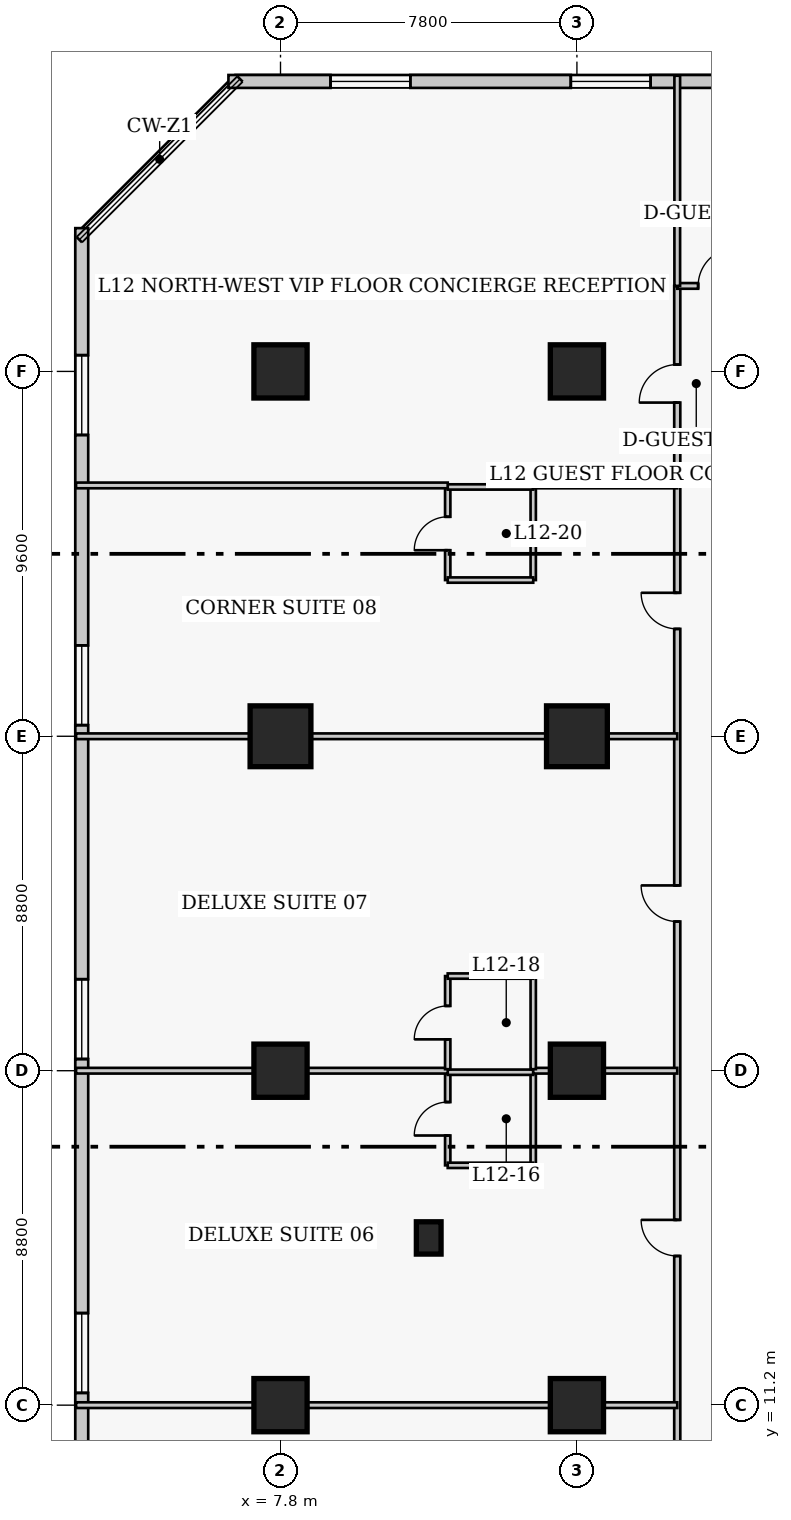
"""IFC4 building model, lengths in metres.
Left out: names, types, materials, properties, quantities, classifications, styles, units other than length and angle.
Written with IfcOpenShell. Run it as: python <this file> out.ifc"""

import sys

from ifc_helpers import new_model, si_unit, direction, frame, frame_2d, origin, origin_2d, place, context, subcontext, project, spatial, rectangle, extrude, element, fill, save


model = new_model("IFC4")
c1 = context("Model", 3, precision=1e-05, world=origin(), true_north=direction((0.0, 1.0)))
c2 = subcontext(c1, "Body", "Model", "MODEL_VIEW")
j1 = project(units=[si_unit("LENGTHUNIT", "METRE"), si_unit("PLANEANGLEUNIT", "RADIAN")], contexts=[c1])
p1 = place(None, origin())
s1 = spatial("IfcSite", under=j1, at=p1, CompositionType="ELEMENT")
p2 = place(p1, origin())
s2 = spatial("IfcBuilding", under=s1, at=p2, CompositionType="ELEMENT")
p3 = place(p2, frame((0.0, 0.0, 52.6)))
s3 = spatial("IfcBuildingStorey", under=s2, at=p3, CompositionType="ELEMENT", Elevation=52.6)
for number, where, z_axis, x_axis in (
    (1, (7.8, 11.2, 0.0), (0.0, 0.0, 1.0), (1.0, 0.0, 0.0)),
    (2, (7.8, 20.0, 0.0), (0.0, 0.0, 1.0), (1.0, 0.0, 0.0)),
):
    element("IfcColumn", number, at=place(p3, frame(where, z_axis=z_axis, x_axis=x_axis)), inside=s3, PredefinedType="COLUMN", context=c2, shape_type="SweptSolid", body=[
        extrude(rectangle(XDim=1.4, YDim=1.4, at=origin_2d()), origin(), (0.0, 0.0, 1.0), 3.8),
    ])
p4 = place(p3, frame((7.8, 28.8, 0.0), z_axis=(0.0, 0.0, 1.0), x_axis=(1.0, 0.0, 0.0)))
e3 = element("IfcColumn", 3, at=p4, inside=s3, PredefinedType="COLUMN", context=c2, shape_type="SweptSolid", body=[
    extrude(rectangle(XDim=1.6, YDim=1.6, at=origin_2d()), origin(), (0.0, 0.0, 1.0), 3.8),
])
for number, where, z_axis, x_axis in (
    (4, (7.8, 38.4, 0.0), (0.0, 0.0, 1.0), (1.0, 0.0, 0.0)),
    (5, (15.6, 11.2, 0.0), (0.0, 0.0, 1.0), (1.0, 0.0, 0.0)),
    (6, (15.6, 20.0, 0.0), (0.0, 0.0, 1.0), (1.0, 0.0, 0.0)),
):
    element("IfcColumn", number, at=place(p3, frame(where, z_axis=z_axis, x_axis=x_axis)), inside=s3, PredefinedType="COLUMN", context=c2, shape_type="SweptSolid", body=[
        extrude(rectangle(XDim=1.4, YDim=1.4, at=origin_2d()), origin(), (0.0, 0.0, 1.0), 3.8),
    ])
p5 = place(p3, frame((15.6, 28.8, 0.0), z_axis=(0.0, 0.0, 1.0), x_axis=(1.0, 0.0, 0.0)))
e7 = element("IfcColumn", 7, at=p5, inside=s3, PredefinedType="COLUMN", context=c2, shape_type="SweptSolid", body=[
    extrude(rectangle(XDim=1.6, YDim=1.6, at=origin_2d()), origin(), (0.0, 0.0, 1.0), 3.8),
])
p6 = place(p3, frame((15.6, 38.4, 0.0), z_axis=(0.0, 0.0, 1.0), x_axis=(1.0, 0.0, 0.0)))
e8 = element("IfcColumn", 8, at=p6, inside=s3, PredefinedType="COLUMN", context=c2, shape_type="SweptSolid", body=[
    extrude(rectangle(XDim=1.4, YDim=1.4, at=origin_2d()), origin(), (0.0, 0.0, 1.0), 3.8),
])
p7 = place(p3, frame((11.7, 15.6, 0.0), z_axis=(0.0, 0.0, 1.0), x_axis=(1.0, 0.0, 0.0)))
e9 = element("IfcColumn", 9, at=p7, inside=s3, PredefinedType="PILASTER", context=c2, shape_type="SweptSolid", body=[
    extrude(rectangle(XDim=0.65, YDim=0.85, at=origin_2d()), origin(), (0.0, 0.0, 1.0), 3.8),
])
p8 = place(p3, frame((36.32, 46.03, 0.0), z_axis=(0.0, 0.0, 1.0), x_axis=(-1.0, 0.0, 0.0)))
e10 = element("IfcWall", 10, at=p8, inside=s3, PredefinedType="SOLIDWALL", context=c2, shape_type="SweptSolid", body=[
    extrude(rectangle(XDim=29.89, YDim=0.34, at=frame_2d((14.945, 0.0))), origin(), (0.0, 0.0, 1.0), 3.54),
])
p9 = place(p8, frame((2.686, 0.0, 0.85)))
e11 = element("IfcOpeningElement", 11, at=p9, cuts=e10, PredefinedType="OPENING", context=c2, shape_type="SweptSolid", body=[
    extrude(rectangle(XDim=2.1, YDim=1.85, at=frame_2d((1.05, 0.925))), frame((0.0, 0.18, 0.0), z_axis=(0.0, -1.0, 0.0), x_axis=(1.0, 0.0, 0.0)), (0.0, 0.0, 1.0), 0.36),
])
p10 = place(p8, frame((10.159, 0.0, 0.85)))
e12 = element("IfcOpeningElement", 12, at=p10, cuts=e10, PredefinedType="OPENING", context=c2, shape_type="SweptSolid", body=[
    extrude(rectangle(XDim=2.1, YDim=1.85, at=frame_2d((1.05, 0.925))), frame((0.0, 0.18, 0.0), z_axis=(0.0, -1.0, 0.0), x_axis=(1.0, 0.0, 0.0)), (0.0, 0.0, 1.0), 0.36),
])
p11 = place(p8, frame((18.781, 0.0, 0.85)))
e13 = element("IfcOpeningElement", 13, at=p11, cuts=e10, PredefinedType="OPENING", context=c2, shape_type="SweptSolid", body=[
    extrude(rectangle(XDim=2.1, YDim=1.85, at=frame_2d((1.05, 0.925))), frame((0.0, 0.18, 0.0), z_axis=(0.0, -1.0, 0.0), x_axis=(1.0, 0.0, 0.0)), (0.0, 0.0, 1.0), 0.36),
])
p12 = place(p8, frame((25.104, 0.0, 0.85)))
e14 = element("IfcOpeningElement", 14, at=p12, cuts=e10, PredefinedType="OPENING", context=c2, shape_type="SweptSolid", body=[
    extrude(rectangle(XDim=2.1, YDim=1.85, at=frame_2d((1.05, 0.925))), frame((0.0, 0.18, 0.0), z_axis=(0.0, -1.0, 0.0), x_axis=(1.0, 0.0, 0.0)), (0.0, 0.0, 1.0), 0.36),
])
p13 = place(p3, frame((2.57, 42.17, 0.0), z_axis=(0.0, 0.0, 1.0), x_axis=(0.0, -1.0, 0.0)))
e15 = element("IfcWall", 15, at=p13, inside=s3, PredefinedType="SOLIDWALL", context=c2, shape_type="SweptSolid", body=[
    extrude(rectangle(XDim=35.14, YDim=0.34, at=frame_2d((17.57, 0.0))), origin(), (0.0, 0.0, 1.0), 3.54),
])
p14 = place(p13, frame((3.343, 0.0, 0.85)))
e16 = element("IfcOpeningElement", 16, at=p14, cuts=e15, PredefinedType="OPENING", context=c2, shape_type="SweptSolid", body=[
    extrude(rectangle(XDim=2.1, YDim=1.85, at=frame_2d((1.05, 0.925))), frame((0.0, 0.18, 0.0), z_axis=(0.0, -1.0, 0.0), x_axis=(1.0, 0.0, 0.0)), (0.0, 0.0, 1.0), 0.36),
])
p15 = place(p13, frame((10.978, 0.0, 0.85)))
e17 = element("IfcOpeningElement", 17, at=p15, cuts=e15, PredefinedType="OPENING", context=c2, shape_type="SweptSolid", body=[
    extrude(rectangle(XDim=2.1, YDim=1.85, at=frame_2d((1.05, 0.925))), frame((0.0, 0.18, 0.0), z_axis=(0.0, -1.0, 0.0), x_axis=(1.0, 0.0, 0.0)), (0.0, 0.0, 1.0), 0.36),
])
p16 = place(p13, frame((19.762, 0.0, 0.85)))
e18 = element("IfcOpeningElement", 18, at=p16, cuts=e15, PredefinedType="OPENING", context=c2, shape_type="SweptSolid", body=[
    extrude(rectangle(XDim=2.1, YDim=1.85, at=frame_2d((1.05, 0.925))), frame((0.0, 0.18, 0.0), z_axis=(0.0, -1.0, 0.0), x_axis=(1.0, 0.0, 0.0)), (0.0, 0.0, 1.0), 0.36),
])
p17 = place(p13, frame((28.548, 0.0, 0.85)))
e19 = element("IfcOpeningElement", 19, at=p17, cuts=e15, PredefinedType="OPENING", context=c2, shape_type="SweptSolid", body=[
    extrude(rectangle(XDim=2.1, YDim=1.85, at=frame_2d((1.05, 0.925))), frame((0.0, 0.18, 0.0), z_axis=(0.0, -1.0, 0.0), x_axis=(1.0, 0.0, 0.0)), (0.0, 0.0, 1.0), 0.36),
])
p18 = place(p3, frame((18.24, 5.05, 0.0), z_axis=(0.0, 0.0, 1.0), x_axis=(0.0, 1.0, 0.0)))
e20 = element("IfcWall", 20, at=p18, inside=s3, PredefinedType="PARTITIONING", context=c2, shape_type="SweptSolid", body=[
    extrude(rectangle(XDim=35.6, YDim=0.16, at=frame_2d((17.8, 0.0))), origin(), (0.0, 0.0, 1.0), 3.54),
])
p19 = place(p18, frame((2.6, 0.0, 0.0)))
e21 = element("IfcOpeningElement", 21, at=p19, cuts=e20, PredefinedType="OPENING", context=c2, shape_type="SweptSolid", body=[
    extrude(rectangle(XDim=0.95, YDim=2.1, at=frame_2d((0.475, 1.05))), frame((0.0, 0.09, 0.0), z_axis=(0.0, -1.0, 0.0), x_axis=(1.0, 0.0, 0.0)), (0.0, 0.0, 1.0), 0.18),
])
p20 = place(p18, frame((10.075, 0.0, 0.0)))
e22 = element("IfcOpeningElement", 22, at=p20, cuts=e20, PredefinedType="OPENING", context=c2, shape_type="SweptSolid", body=[
    extrude(rectangle(XDim=0.95, YDim=2.1, at=frame_2d((0.475, 1.05))), frame((0.0, 0.09, 0.0), z_axis=(0.0, -1.0, 0.0), x_axis=(1.0, 0.0, 0.0)), (0.0, 0.0, 1.0), 0.18),
])
p21 = place(p18, frame((18.875, 0.0, 0.0)))
e23 = element("IfcOpeningElement", 23, at=p21, cuts=e20, PredefinedType="OPENING", context=c2, shape_type="SweptSolid", body=[
    extrude(rectangle(XDim=0.95, YDim=2.1, at=frame_2d((0.475, 1.05))), frame((0.0, 0.09, 0.0), z_axis=(0.0, -1.0, 0.0), x_axis=(1.0, 0.0, 0.0)), (0.0, 0.0, 1.0), 0.18),
])
p22 = place(p18, frame((26.575, 0.0, 0.0)))
e24 = element("IfcOpeningElement", 24, at=p22, cuts=e20, PredefinedType="OPENING", context=c2, shape_type="SweptSolid", body=[
    extrude(rectangle(XDim=0.95, YDim=2.1, at=frame_2d((0.475, 1.05))), frame((0.0, 0.09, 0.0), z_axis=(0.0, -1.0, 0.0), x_axis=(1.0, 0.0, 0.0)), (0.0, 0.0, 1.0), 0.18),
])
p23 = place(p18, frame((32.53, 0.0, 0.0)))
e25 = element("IfcOpeningElement", 25, at=p23, cuts=e20, PredefinedType="OPENING", context=c2, shape_type="SweptSolid", body=[
    extrude(rectangle(XDim=1.0, YDim=2.15, at=frame_2d((0.5, 1.075))), frame((0.0, 0.09, 0.0), z_axis=(0.0, -1.0, 0.0), x_axis=(1.0, 0.0, 0.0)), (0.0, 0.0, 1.0), 0.18),
])
p24 = place(p3, frame((18.24, 40.65, 0.0), z_axis=(0.0, 0.0, 1.0), x_axis=(1.0, 0.0, 0.0)))
e26 = element("IfcWall", 26, at=p24, inside=s3, PredefinedType="PARTITIONING", context=c2, shape_type="SweptSolid", body=[
    extrude(rectangle(XDim=3.86, YDim=0.15, at=frame_2d((1.93, 0.0))), origin(), (0.0, 0.0, 1.0), 3.54),
])
p25 = place(p24, frame((0.55, 0.0, 0.0)))
e27 = element("IfcOpeningElement", 27, at=p25, cuts=e26, PredefinedType="OPENING", context=c2, shape_type="SweptSolid", body=[
    extrude(rectangle(XDim=1.0, YDim=2.15, at=frame_2d((0.5, 1.075))), frame((0.0, 0.085, 0.0), z_axis=(0.0, -1.0, 0.0), x_axis=(1.0, 0.0, 0.0)), (0.0, 0.0, 1.0), 0.17),
])
p26 = place(p3, frame((18.24, 40.65, 0.0), z_axis=(0.0, 0.0, 1.0), x_axis=(0.0, 1.0, 0.0)))
e28 = element("IfcWall", 28, at=p26, inside=s3, PredefinedType="PARTITIONING", context=c2, shape_type="SweptSolid", body=[
    extrude(rectangle(XDim=5.53, YDim=0.15, at=frame_2d((2.765, 0.0))), origin(), (0.0, 0.0, 1.0), 3.54),
])
p27 = place(p3, frame((2.42, 11.2, 0.0), z_axis=(0.0, 0.0, 1.0), x_axis=(1.0, 0.0, 0.0)))
e29 = element("IfcWall", 29, at=p27, inside=s3, PredefinedType="PARTITIONING", context=c2, shape_type="SweptSolid", body=[
    extrude(rectangle(XDim=15.82, YDim=0.15, at=frame_2d((7.91, 0.0))), origin(), (0.0, 0.0, 1.0), 2.593),
])
p28 = place(p3, frame((12.2, 17.51, 0.0), z_axis=(0.0, 0.0, 1.0), x_axis=(0.0, 1.0, 0.0)))
e30 = element("IfcWall", 30, at=p28, inside=s3, PredefinedType="PLUMBINGWALL", context=c2, shape_type="SweptSolid", body=[
    extrude(rectangle(XDim=2.45, YDim=0.14, at=frame_2d((1.225, 0.0))), origin(), (0.0, 0.0, 1.0), 3.54),
])
p29 = place(p28, frame((0.785, 0.0, 0.0)))
e31 = element("IfcOpeningElement", 31, at=p29, cuts=e30, PredefinedType="OPENING", context=c2, shape_type="SweptSolid", body=[
    extrude(rectangle(XDim=0.88, YDim=2.05, at=frame_2d((0.44, 1.025))), frame((0.0, 0.08, 0.0), z_axis=(0.0, -1.0, 0.0), x_axis=(1.0, 0.0, 0.0)), (0.0, 0.0, 1.0), 0.16),
])
p30 = place(p3, frame((14.45, 17.51, 0.0), z_axis=(0.0, 0.0, 1.0), x_axis=(0.0, 1.0, 0.0)))
e32 = element("IfcWall", 32, at=p30, inside=s3, PredefinedType="PLUMBINGWALL", context=c2, shape_type="SweptSolid", body=[
    extrude(rectangle(XDim=2.45, YDim=0.14, at=frame_2d((1.225, 0.0))), origin(), (0.0, 0.0, 1.0), 3.54),
])
p31 = place(p3, frame((12.2, 17.51, 0.0), z_axis=(0.0, 0.0, 1.0), x_axis=(1.0, 0.0, 0.0)))
e33 = element("IfcWall", 33, at=p31, inside=s3, PredefinedType="PLUMBINGWALL", context=c2, shape_type="SweptSolid", body=[
    extrude(rectangle(XDim=2.25, YDim=0.14, at=frame_2d((1.125, 0.0))), origin(), (0.0, 0.0, 1.0), 3.54),
])
p32 = place(p3, frame((12.2, 19.96, 0.0), z_axis=(0.0, 0.0, 1.0), x_axis=(1.0, 0.0, 0.0)))
e34 = element("IfcWall", 34, at=p32, inside=s3, PredefinedType="PLUMBINGWALL", context=c2, shape_type="SweptSolid", body=[
    extrude(rectangle(XDim=2.25, YDim=0.14, at=frame_2d((1.125, 0.0))), origin(), (0.0, 0.0, 1.0), 2.593),
])
p33 = place(p3, frame((2.42, 20.0, 0.0), z_axis=(0.0, 0.0, 1.0), x_axis=(1.0, 0.0, 0.0)))
e35 = element("IfcWall", 35, at=p33, inside=s3, PredefinedType="PARTITIONING", context=c2, shape_type="SweptSolid", body=[
    extrude(rectangle(XDim=9.78, YDim=0.15, at=frame_2d((4.89, 0.0))), origin(), (0.0, 0.0, 1.0), 2.593),
])
p34 = place(p3, frame((14.45, 20.0, 0.0), z_axis=(0.0, 0.0, 1.0), x_axis=(1.0, 0.0, 0.0)))
e36 = element("IfcWall", 36, at=p34, inside=s3, PredefinedType="PARTITIONING", context=c2, shape_type="SweptSolid", body=[
    extrude(rectangle(XDim=3.79, YDim=0.15, at=frame_2d((1.895, 0.0))), origin(), (0.0, 0.0, 1.0), 2.593),
])
p35 = place(p3, frame((12.2, 20.04, 0.0), z_axis=(0.0, 0.0, 1.0), x_axis=(0.0, 1.0, 0.0)))
e37 = element("IfcWall", 37, at=p35, inside=s3, PredefinedType="PLUMBINGWALL", context=c2, shape_type="SweptSolid", body=[
    extrude(rectangle(XDim=2.45, YDim=0.14, at=frame_2d((1.225, 0.0))), origin(), (0.0, 0.0, 1.0), 3.54),
])
p36 = place(p35, frame((0.785, 0.0, 0.0)))
e38 = element("IfcOpeningElement", 38, at=p36, cuts=e37, PredefinedType="OPENING", context=c2, shape_type="SweptSolid", body=[
    extrude(rectangle(XDim=0.88, YDim=2.05, at=frame_2d((0.44, 1.025))), frame((0.0, 0.08, 0.0), z_axis=(0.0, -1.0, 0.0), x_axis=(1.0, 0.0, 0.0)), (0.0, 0.0, 1.0), 0.16),
])
p37 = place(p3, frame((14.45, 20.04, 0.0), z_axis=(0.0, 0.0, 1.0), x_axis=(0.0, 1.0, 0.0)))
e39 = element("IfcWall", 39, at=p37, inside=s3, PredefinedType="PLUMBINGWALL", context=c2, shape_type="SweptSolid", body=[
    extrude(rectangle(XDim=2.45, YDim=0.14, at=frame_2d((1.225, 0.0))), origin(), (0.0, 0.0, 1.0), 3.54),
])
p38 = place(p3, frame((12.2, 22.49, 0.0), z_axis=(0.0, 0.0, 1.0), x_axis=(1.0, 0.0, 0.0)))
e40 = element("IfcWall", 40, at=p38, inside=s3, PredefinedType="PLUMBINGWALL", context=c2, shape_type="SweptSolid", body=[
    extrude(rectangle(XDim=2.25, YDim=0.14, at=frame_2d((1.125, 0.0))), origin(), (0.0, 0.0, 1.0), 3.54),
])
p39 = place(p3, frame((2.42, 28.8, 0.0), z_axis=(0.0, 0.0, 1.0), x_axis=(1.0, 0.0, 0.0)))
e41 = element("IfcWall", 41, at=p39, inside=s3, PredefinedType="PARTITIONING", context=c2, shape_type="SweptSolid", body=[
    extrude(rectangle(XDim=15.82, YDim=0.15, at=frame_2d((7.91, 0.0))), origin(), (0.0, 0.0, 1.0), 2.593),
])
p40 = place(p3, frame((12.2, 32.91, 0.0), z_axis=(0.0, 0.0, 1.0), x_axis=(0.0, 1.0, 0.0)))
e42 = element("IfcWall", 42, at=p40, inside=s3, PredefinedType="PLUMBINGWALL", context=c2, shape_type="SweptSolid", body=[
    extrude(rectangle(XDim=2.45, YDim=0.14, at=frame_2d((1.225, 0.0))), origin(), (0.0, 0.0, 1.0), 3.54),
])
p41 = place(p40, frame((0.785, 0.0, 0.0)))
e43 = element("IfcOpeningElement", 43, at=p41, cuts=e42, PredefinedType="OPENING", context=c2, shape_type="SweptSolid", body=[
    extrude(rectangle(XDim=0.88, YDim=2.05, at=frame_2d((0.44, 1.025))), frame((0.0, 0.08, 0.0), z_axis=(0.0, -1.0, 0.0), x_axis=(1.0, 0.0, 0.0)), (0.0, 0.0, 1.0), 0.16),
])
p42 = place(p3, frame((14.45, 32.91, 0.0), z_axis=(0.0, 0.0, 1.0), x_axis=(0.0, 1.0, 0.0)))
e44 = element("IfcWall", 44, at=p42, inside=s3, PredefinedType="PLUMBINGWALL", context=c2, shape_type="SweptSolid", body=[
    extrude(rectangle(XDim=2.45, YDim=0.14, at=frame_2d((1.225, 0.0))), origin(), (0.0, 0.0, 1.0), 3.54),
])
for number, where, z_axis, x_axis in (
    (45, (12.2, 32.91, 0.0), (0.0, 0.0, 1.0), (1.0, 0.0, 0.0)),
    (46, (12.2, 35.36, 0.0), (0.0, 0.0, 1.0), (1.0, 0.0, 0.0)),
):
    element("IfcWall", number, at=place(p3, frame(where, z_axis=z_axis, x_axis=x_axis)), inside=s3, PredefinedType="PLUMBINGWALL", context=c2, shape_type="SweptSolid", body=[
        extrude(rectangle(XDim=2.25, YDim=0.14, at=frame_2d((1.125, 0.0))), origin(), (0.0, 0.0, 1.0), 3.54),
    ])
p43 = place(p3, frame((2.42, 35.4, 0.0), z_axis=(0.0, 0.0, 1.0), x_axis=(1.0, 0.0, 0.0)))
e47 = element("IfcWall", 47, at=p43, inside=s3, PredefinedType="PARTITIONING", context=c2, shape_type="SweptSolid", body=[
    extrude(rectangle(XDim=9.78, YDim=0.15, at=frame_2d((4.89, 0.0))), origin(), (0.0, 0.0, 1.0), 3.54),
])
p44 = place(p3, frame((14.45, 35.4, 0.0), z_axis=(0.0, 0.0, 1.0), x_axis=(1.0, 0.0, 0.0)))
e48 = element("IfcWall", 48, at=p44, inside=s3, PredefinedType="PARTITIONING", context=c2, shape_type="SweptSolid", body=[
    extrude(rectangle(XDim=3.79, YDim=0.15, at=frame_2d((1.895, 0.0))), origin(), (0.0, 0.0, 1.0), 3.54),
])
p45 = place(p11, origin())
e49 = element("IfcWindow", 49, at=p45, inside=s3, PartitioningType="SINGLE_PANEL", PredefinedType="WINDOW", context=c2, shape_type="SweptSolid", body=[
    extrude(rectangle(XDim=2.1, YDim=1.85, at=frame_2d((1.05, 0.925))), frame((0.0, 0.03, 0.0), z_axis=(0.0, -1.0, 0.0), x_axis=(1.0, 0.0, 0.0)), (0.0, 0.0, 1.0), 0.06),
])
fill(e13, e49)
p46 = place(p12, origin())
e50 = element("IfcWindow", 50, at=p46, inside=s3, PartitioningType="SINGLE_PANEL", PredefinedType="WINDOW", context=c2, shape_type="SweptSolid", body=[
    extrude(rectangle(XDim=2.1, YDim=1.85, at=frame_2d((1.05, 0.925))), frame((0.0, 0.03, 0.0), z_axis=(0.0, -1.0, 0.0), x_axis=(1.0, 0.0, 0.0)), (0.0, 0.0, 1.0), 0.06),
])
fill(e14, e50)
p47 = place(p14, origin())
e51 = element("IfcWindow", 51, at=p47, inside=s3, PartitioningType="SINGLE_PANEL", PredefinedType="WINDOW", context=c2, shape_type="SweptSolid", body=[
    extrude(rectangle(XDim=2.1, YDim=1.85, at=frame_2d((1.05, 0.925))), frame((0.0, 0.03, 0.0), z_axis=(0.0, -1.0, 0.0), x_axis=(1.0, 0.0, 0.0)), (0.0, 0.0, 1.0), 0.06),
])
fill(e16, e51)
p48 = place(p15, origin())
e52 = element("IfcWindow", 52, at=p48, inside=s3, PartitioningType="SINGLE_PANEL", PredefinedType="WINDOW", context=c2, shape_type="SweptSolid", body=[
    extrude(rectangle(XDim=2.1, YDim=1.85, at=frame_2d((1.05, 0.925))), frame((0.0, 0.03, 0.0), z_axis=(0.0, -1.0, 0.0), x_axis=(1.0, 0.0, 0.0)), (0.0, 0.0, 1.0), 0.06),
])
fill(e17, e52)
p49 = place(p16, origin())
e53 = element("IfcWindow", 53, at=p49, inside=s3, PartitioningType="SINGLE_PANEL", PredefinedType="WINDOW", context=c2, shape_type="SweptSolid", body=[
    extrude(rectangle(XDim=2.1, YDim=1.85, at=frame_2d((1.05, 0.925))), frame((0.0, 0.03, 0.0), z_axis=(0.0, -1.0, 0.0), x_axis=(1.0, 0.0, 0.0)), (0.0, 0.0, 1.0), 0.06),
])
fill(e18, e53)
p50 = place(p17, origin())
e54 = element("IfcWindow", 54, at=p50, inside=s3, PartitioningType="SINGLE_PANEL", PredefinedType="WINDOW", context=c2, shape_type="SweptSolid", body=[
    extrude(rectangle(XDim=2.1, YDim=1.85, at=frame_2d((1.05, 0.925))), frame((0.0, 0.03, 0.0), z_axis=(0.0, -1.0, 0.0), x_axis=(1.0, 0.0, 0.0)), (0.0, 0.0, 1.0), 0.06),
])
fill(e19, e54)
p51 = place(p25, origin())
e55 = element("IfcDoor", 55, at=p51, inside=s3, OperationType="SINGLE_SWING_RIGHT", PredefinedType="DOOR", context=c2, shape_type="SweptSolid", body=[
    extrude(rectangle(XDim=1.0, YDim=2.15, at=frame_2d((0.5, 1.075))), frame((0.0, 0.025, 0.0), z_axis=(0.0, -1.0, 0.0), x_axis=(1.0, 0.0, 0.0)), (0.0, 0.0, 1.0), 0.05),
])
fill(e27, e55)
p52 = place(p29, origin())
e56 = element("IfcDoor", 56, at=p52, inside=s3, OperationType="SINGLE_SWING_LEFT", PredefinedType="DOOR", context=c2, shape_type="SweptSolid", body=[
    extrude(rectangle(XDim=0.88, YDim=2.05, at=frame_2d((0.44, 1.025))), frame((0.0, 0.025, 0.0), z_axis=(0.0, -1.0, 0.0), x_axis=(1.0, 0.0, 0.0)), (0.0, 0.0, 1.0), 0.05),
])
fill(e31, e56)
p53 = place(p20, origin())
e57 = element("IfcDoor", 57, at=p53, inside=s3, OperationType="SINGLE_SWING_RIGHT", PredefinedType="DOOR", context=c2, shape_type="SweptSolid", body=[
    extrude(rectangle(XDim=0.95, YDim=2.1, at=frame_2d((0.475, 1.05))), frame((0.0, 0.025, 0.0), z_axis=(0.0, -1.0, 0.0), x_axis=(1.0, 0.0, 0.0)), (0.0, 0.0, 1.0), 0.05),
])
fill(e22, e57)
p54 = place(p36, origin())
e58 = element("IfcDoor", 58, at=p54, inside=s3, OperationType="SINGLE_SWING_LEFT", PredefinedType="DOOR", context=c2, shape_type="SweptSolid", body=[
    extrude(rectangle(XDim=0.88, YDim=2.05, at=frame_2d((0.44, 1.025))), frame((0.0, 0.025, 0.0), z_axis=(0.0, -1.0, 0.0), x_axis=(1.0, 0.0, 0.0)), (0.0, 0.0, 1.0), 0.05),
])
fill(e38, e58)
p55 = place(p21, origin())
e59 = element("IfcDoor", 59, at=p55, inside=s3, OperationType="SINGLE_SWING_RIGHT", PredefinedType="DOOR", context=c2, shape_type="SweptSolid", body=[
    extrude(rectangle(XDim=0.95, YDim=2.1, at=frame_2d((0.475, 1.05))), frame((0.0, 0.025, 0.0), z_axis=(0.0, -1.0, 0.0), x_axis=(1.0, 0.0, 0.0)), (0.0, 0.0, 1.0), 0.05),
])
fill(e23, e59)
p56 = place(p41, origin())
e60 = element("IfcDoor", 60, at=p56, inside=s3, OperationType="SINGLE_SWING_LEFT", PredefinedType="DOOR", context=c2, shape_type="SweptSolid", body=[
    extrude(rectangle(XDim=0.88, YDim=2.05, at=frame_2d((0.44, 1.025))), frame((0.0, 0.025, 0.0), z_axis=(0.0, -1.0, 0.0), x_axis=(1.0, 0.0, 0.0)), (0.0, 0.0, 1.0), 0.05),
])
fill(e43, e60)
p57 = place(p22, origin())
e61 = element("IfcDoor", 61, at=p57, inside=s3, OperationType="SINGLE_SWING_RIGHT", PredefinedType="DOOR", context=c2, shape_type="SweptSolid", body=[
    extrude(rectangle(XDim=0.95, YDim=2.1, at=frame_2d((0.475, 1.05))), frame((0.0, 0.025, 0.0), z_axis=(0.0, -1.0, 0.0), x_axis=(1.0, 0.0, 0.0)), (0.0, 0.0, 1.0), 0.05),
])
fill(e24, e61)
p58 = place(p23, origin())
e62 = element("IfcDoor", 62, at=p58, inside=s3, OperationType="SINGLE_SWING_LEFT", PredefinedType="DOOR", context=c2, shape_type="SweptSolid", body=[
    extrude(rectangle(XDim=1.0, YDim=2.15, at=frame_2d((0.5, 1.075))), frame((0.0, 0.025, 0.0), z_axis=(0.0, -1.0, 0.0), x_axis=(1.0, 0.0, 0.0)), (0.0, 0.0, 1.0), 0.05),
])
fill(e25, e62)
save(model, sys.argv[1])
